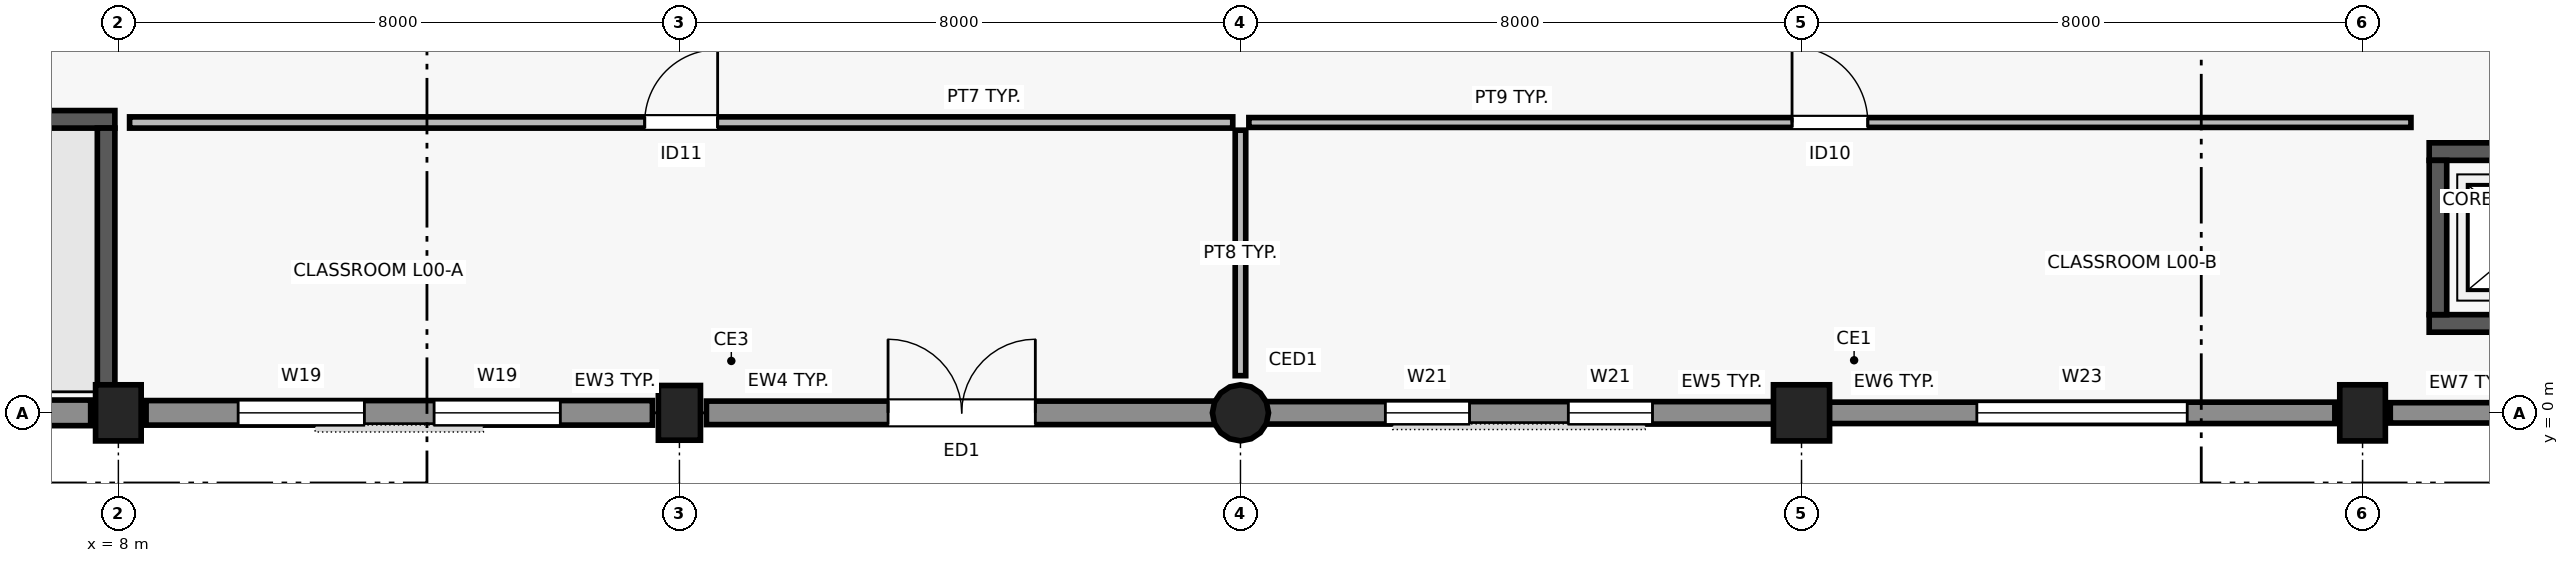
"""IFC4 building model, lengths in metres.
Left out: names, types, materials, properties, quantities, classifications, styles, units other than length and angle.
Written with IfcOpenShell. Run it as: python <this file> out.ifc"""

import sys

from ifc_helpers import new_model, si_unit, direction, frame, frame_2d, origin, origin_2d, place, context, subcontext, project, spatial, rectangle, circle, extrude, element, fill, save


model = new_model("IFC4")
c1 = context("Model", 3, precision=1e-05, world=origin(), true_north=direction((0.0, 1.0)))
c2 = subcontext(c1, "Body", "Model", "MODEL_VIEW")
j1 = project(units=[si_unit("LENGTHUNIT", "METRE"), si_unit("PLANEANGLEUNIT", "RADIAN")], contexts=[c1])
p1 = place(None, origin())
s1 = spatial("IfcSite", under=j1, at=p1, CompositionType="ELEMENT")
p2 = place(p1, origin())
s2 = spatial("IfcBuilding", under=s1, at=p2, CompositionType="ELEMENT")
p3 = place(p2, origin())
s3 = spatial("IfcBuildingStorey", under=s2, at=p3, CompositionType="ELEMENT", Elevation=0.0)
p4 = place(p3, frame((8.0, 0.0, 0.0), z_axis=(0.0, 0.0, 1.0), x_axis=(1.0, 0.0, 0.0)))
e1 = element("IfcColumn", 1, at=p4, inside=s3, PredefinedType="COLUMN", context=c2, shape_type="SweptSolid", body=[
    extrude(rectangle(XDim=0.8, YDim=0.65, at=origin_2d()), origin(), (0.0, 0.0, 1.0), 4.5),
])
p5 = place(p3, frame((16.0, 0.0, 0.0), z_axis=(0.0, 0.0, 1.0), x_axis=(1.0, 0.0, 0.0)))
e2 = element("IfcColumn", 2, at=p5, inside=s3, PredefinedType="COLUMN", context=c2, shape_type="SweptSolid", body=[
    extrude(rectangle(XDim=0.78, YDim=0.6, at=origin_2d()), origin(), (0.0, 0.0, 1.0), 4.5),
])
p6 = place(p3, frame((24.0, 0.0, 0.0), z_axis=(0.0, 0.0, 1.0), x_axis=(1.0, 0.0, 0.0)))
e3 = element("IfcColumn", 3, at=p6, inside=s3, PredefinedType="COLUMN", context=c2, shape_type="SweptSolid", body=[
    extrude(circle(Radius=0.4, at=origin_2d()), origin(), (0.0, 0.0, 1.0), 4.5),
])
p7 = place(p3, frame((32.0, 0.0, 0.0), z_axis=(0.0, 0.0, 1.0), x_axis=(1.0, 0.0, 0.0)))
e4 = element("IfcColumn", 4, at=p7, inside=s3, PredefinedType="COLUMN", context=c2, shape_type="SweptSolid", body=[
    extrude(rectangle(XDim=0.8, YDim=0.8, at=origin_2d()), origin(), (0.0, 0.0, 1.0), 4.5),
])
p8 = place(p3, frame((40.0, 0.0, 0.0), z_axis=(0.0, 0.0, 1.0), x_axis=(1.0, 0.0, 0.0)))
e5 = element("IfcColumn", 5, at=p8, inside=s3, PredefinedType="COLUMN", context=c2, shape_type="SweptSolid", body=[
    extrude(rectangle(XDim=0.8, YDim=0.65, at=origin_2d()), origin(), (0.0, 0.0, 1.0), 4.5),
])
p9 = place(p3, frame((0.395, 0.0, 0.0), z_axis=(0.0, 0.0, 1.0), x_axis=(1.0, 0.0, 0.0)))
e6 = element("IfcWall", 6, at=p9, inside=s3, PredefinedType="SOLIDWALL", context=c2, shape_type="SweptSolid", body=[
    extrude(rectangle(XDim=7.21, YDim=0.365, at=frame_2d((3.605, 0.0))), origin(), (0.0, 0.0, 1.0), 4.22),
])
p10 = place(p9, frame((2.88, 0.0, 0.0)))
e7 = element("IfcOpeningElement", 7, at=p10, cuts=e6, PredefinedType="OPENING", context=c2, shape_type="SweptSolid", body=[
    extrude(rectangle(XDim=1.45, YDim=2.2, at=frame_2d((0.725, 1.1))), frame((0.0, 0.192, 0.0), z_axis=(0.0, -1.0, 0.0), x_axis=(1.0, 0.0, 0.0)), (0.0, 0.0, 1.0), 0.385),
])
p11 = place(p3, frame((8.395, 0.0, 0.0), z_axis=(0.0, 0.0, 1.0), x_axis=(1.0, 0.0, 0.0)))
e8 = element("IfcWall", 8, at=p11, inside=s3, PredefinedType="SOLIDWALL", context=c2, shape_type="SweptSolid", body=[
    extrude(rectangle(XDim=7.22, YDim=0.35, at=frame_2d((3.61, 0.0))), origin(), (0.0, 0.0, 1.0), 4.22),
])
p12 = place(p11, frame((1.313, 0.0, 0.9)))
e9 = element("IfcOpeningElement", 9, at=p12, cuts=e8, PredefinedType="OPENING", context=c2, shape_type="SweptSolid", body=[
    extrude(rectangle(XDim=1.8, YDim=1.25, at=frame_2d((0.9, 0.625))), frame((0.0, 0.185, 0.0), z_axis=(0.0, -1.0, 0.0), x_axis=(1.0, 0.0, 0.0)), (0.0, 0.0, 1.0), 0.37),
])
p13 = place(p11, frame((4.107, 0.0, 0.9)))
e10 = element("IfcOpeningElement", 10, at=p13, cuts=e8, PredefinedType="OPENING", context=c2, shape_type="SweptSolid", body=[
    extrude(rectangle(XDim=1.8, YDim=1.25, at=frame_2d((0.9, 0.625))), frame((0.0, 0.185, 0.0), z_axis=(0.0, -1.0, 0.0), x_axis=(1.0, 0.0, 0.0)), (0.0, 0.0, 1.0), 0.37),
])
p14 = place(p3, frame((16.385, 0.0, 0.0), z_axis=(0.0, 0.0, 1.0), x_axis=(1.0, 0.0, 0.0)))
e11 = element("IfcWall", 11, at=p14, inside=s3, PredefinedType="SOLIDWALL", context=c2, shape_type="SweptSolid", body=[
    extrude(rectangle(XDim=7.279, YDim=0.335, at=frame_2d((3.64, 0.0))), origin(), (0.0, 0.0, 1.0), 3.57),
])
p15 = place(p14, frame((2.59, 0.0, 0.0)))
e12 = element("IfcOpeningElement", 12, at=p15, cuts=e11, PredefinedType="OPENING", context=c2, shape_type="SweptSolid", body=[
    extrude(rectangle(XDim=2.1, YDim=2.4, at=frame_2d((1.05, 1.2))), frame((0.0, 0.177, 0.0), z_axis=(0.0, -1.0, 0.0), x_axis=(1.0, 0.0, 0.0)), (0.0, 0.0, 1.0), 0.355),
])
p16 = place(p3, frame((24.336, 0.0, 0.0), z_axis=(0.0, 0.0, 1.0), x_axis=(1.0, 0.0, 0.0)))
e13 = element("IfcWall", 13, at=p16, inside=s3, PredefinedType="SOLIDWALL", context=c2, shape_type="SweptSolid", body=[
    extrude(rectangle(XDim=7.269, YDim=0.32, at=frame_2d((3.635, 0.0))), origin(), (0.0, 0.0, 1.0), 3.54),
])
p17 = place(p16, frame((1.73, 0.0, 0.9)))
e14 = element("IfcOpeningElement", 14, at=p17, cuts=e13, PredefinedType="OPENING", context=c2, shape_type="SweptSolid", body=[
    extrude(rectangle(XDim=1.2, YDim=1.25, at=frame_2d((0.6, 0.625))), frame((0.0, 0.17, 0.0), z_axis=(0.0, -1.0, 0.0), x_axis=(1.0, 0.0, 0.0)), (0.0, 0.0, 1.0), 0.34),
])
p18 = place(p16, frame((4.339, 0.0, 0.9)))
e15 = element("IfcOpeningElement", 15, at=p18, cuts=e13, PredefinedType="OPENING", context=c2, shape_type="SweptSolid", body=[
    extrude(rectangle(XDim=1.2, YDim=1.25, at=frame_2d((0.6, 0.625))), frame((0.0, 0.17, 0.0), z_axis=(0.0, -1.0, 0.0), x_axis=(1.0, 0.0, 0.0)), (0.0, 0.0, 1.0), 0.34),
])
p19 = place(p3, frame((32.395, 0.0, 0.0), z_axis=(0.0, 0.0, 1.0), x_axis=(1.0, 0.0, 0.0)))
e16 = element("IfcWall", 16, at=p19, inside=s3, PredefinedType="SOLIDWALL", context=c2, shape_type="SweptSolid", body=[
    extrude(rectangle(XDim=7.21, YDim=0.305, at=frame_2d((3.605, 0.0))), origin(), (0.0, 0.0, 1.0), 3.67),
])
p20 = place(p19, frame((2.105, 0.0, 0.9)))
e17 = element("IfcOpeningElement", 17, at=p20, cuts=e16, PredefinedType="OPENING", context=c2, shape_type="SweptSolid", body=[
    extrude(rectangle(XDim=3.0, YDim=1.65, at=frame_2d((1.5, 0.825))), frame((0.0, 0.162, 0.0), z_axis=(0.0, -1.0, 0.0), x_axis=(1.0, 0.0, 0.0)), (0.0, 0.0, 1.0), 0.325),
])
p21 = place(p3, frame((40.395, 0.0, 0.0), z_axis=(0.0, 0.0, 1.0), x_axis=(1.0, 0.0, 0.0)))
e18 = element("IfcWall", 18, at=p21, inside=s3, PredefinedType="SOLIDWALL", context=c2, shape_type="SweptSolid", body=[
    extrude(rectangle(XDim=7.22, YDim=0.29, at=frame_2d((3.61, 0.0))), origin(), (0.0, 0.0, 1.0), 3.54),
])
p22 = place(p21, frame((2.512, 0.0, 0.9)))
e19 = element("IfcOpeningElement", 19, at=p22, cuts=e18, PredefinedType="OPENING", context=c2, shape_type="SweptSolid", body=[
    extrude(rectangle(XDim=2.6, YDim=1.65, at=frame_2d((1.3, 0.825))), frame((0.0, 0.155, 0.0), z_axis=(0.0, -1.0, 0.0), x_axis=(1.0, 0.0, 0.0)), (0.0, 0.0, 1.0), 0.31),
])
p23 = place(p3, frame((40.95, 1.275, 0.0), z_axis=(0.0, 0.0, 1.0), x_axis=(1.0, 0.0, 0.0)))
e20 = element("IfcWall", 20, at=p23, inside=s3, PredefinedType="SHEAR", context=c2, shape_type="SweptSolid", body=[
    extrude(rectangle(XDim=2.9, YDim=0.25, at=frame_2d((1.45, 0.0))), origin(), (0.0, 0.0, 1.0), 4.22),
])
p24 = place(p3, frame((40.95, 3.725, 0.0), z_axis=(0.0, 0.0, 1.0), x_axis=(1.0, 0.0, 0.0)))
e21 = element("IfcWall", 21, at=p24, inside=s3, PredefinedType="SHEAR", context=c2, shape_type="SweptSolid", body=[
    extrude(rectangle(XDim=2.9, YDim=0.25, at=frame_2d((1.45, 0.0))), origin(), (0.0, 0.0, 1.0), 4.22),
])
p25 = place(p24, frame((0.95, 0.0, 0.0)))
e22 = element("IfcOpeningElement", 22, at=p25, cuts=e21, PredefinedType="OPENING", context=c2, shape_type="SweptSolid", body=[
    extrude(rectangle(XDim=1.0, YDim=2.15, at=frame_2d((0.5, 1.075))), frame((0.0, 0.135, 0.0), z_axis=(0.0, -1.0, 0.0), x_axis=(1.0, 0.0, 0.0)), (0.0, 0.0, 1.0), 0.27),
])
p26 = place(p3, frame((41.075, 1.4, 0.0), z_axis=(0.0, 0.0, 1.0), x_axis=(0.0, 1.0, 0.0)))
e23 = element("IfcWall", 23, at=p26, inside=s3, PredefinedType="SHEAR", context=c2, shape_type="SweptSolid", body=[
    extrude(rectangle(XDim=2.2, YDim=0.25, at=frame_2d((1.1, 0.0))), origin(), (0.0, 0.0, 1.0), 4.22),
])
p27 = place(p3, frame((0.05, 4.185, 0.0), z_axis=(0.0, 0.0, 1.0), x_axis=(1.0, 0.0, 0.0)))
e24 = element("IfcWall", 24, at=p27, inside=s3, PredefinedType="SHEAR", context=c2, shape_type="SweptSolid", body=[
    extrude(rectangle(XDim=7.9, YDim=0.25, at=frame_2d((3.95, 0.0))), origin(), (0.0, 0.0, 1.0), 4.22),
])
p28 = place(p27, frame((0.5, 0.0, 0.0)))
e25 = element("IfcOpeningElement", 25, at=p28, cuts=e24, PredefinedType="OPENING", context=c2, shape_type="SweptSolid", body=[
    extrude(rectangle(XDim=1.25, YDim=2.2, at=frame_2d((0.625, 1.1))), frame((0.0, 0.135, 0.0), z_axis=(0.0, -1.0, 0.0), x_axis=(1.0, 0.0, 0.0)), (0.0, 0.0, 1.0), 0.27),
])
p29 = place(p3, frame((7.825, 0.3, 0.0), z_axis=(0.0, 0.0, 1.0), x_axis=(0.0, 1.0, 0.0)))
e26 = element("IfcWall", 26, at=p29, inside=s3, PredefinedType="SHEAR", context=c2, shape_type="SweptSolid", body=[
    extrude(rectangle(XDim=3.76, YDim=0.25, at=frame_2d((1.88, 0.0))), origin(), (0.0, 0.0, 1.0), 4.22),
])
p30 = place(p3, frame((8.16, 4.14, 0.0), z_axis=(0.0, 0.0, 1.0), x_axis=(1.0, 0.0, 0.0)))
e27 = element("IfcWall", 27, at=p30, inside=s3, PredefinedType="PARTITIONING", context=c2, shape_type="SweptSolid", body=[
    extrude(rectangle(XDim=15.73, YDim=0.16, at=frame_2d((7.865, 0.0))), origin(), (0.0, 0.0, 1.0), 4.2),
])
p31 = place(p30, frame((7.345, 0.0, 0.0)))
e28 = element("IfcOpeningElement", 28, at=p31, cuts=e27, PredefinedType="OPENING", context=c2, shape_type="SweptSolid", body=[
    extrude(rectangle(XDim=1.04, YDim=2.15, at=frame_2d((0.52, 1.075))), frame((0.0, 0.09, 0.0), z_axis=(0.0, -1.0, 0.0), x_axis=(1.0, 0.0, 0.0)), (0.0, 0.0, 1.0), 0.18),
])
p32 = place(p3, frame((24.0, 0.53, 0.0), z_axis=(0.0, 0.0, 1.0), x_axis=(0.0, 1.0, 0.0)))
e29 = element("IfcWall", 29, at=p32, inside=s3, PredefinedType="PARTITIONING", context=c2, shape_type="SweptSolid", body=[
    extrude(rectangle(XDim=3.5, YDim=0.15, at=frame_2d((1.75, 0.0))), origin(), (0.0, 0.0, 1.0), 3.7),
])
p33 = place(p3, frame((24.12, 4.14, 0.0), z_axis=(0.0, 0.0, 1.0), x_axis=(1.0, 0.0, 0.0)))
e30 = element("IfcWall", 30, at=p33, inside=s3, PredefinedType="PARTITIONING", context=c2, shape_type="SweptSolid", body=[
    extrude(rectangle(XDim=16.57, YDim=0.14, at=frame_2d((8.285, 0.0))), origin(), (0.0, 0.0, 1.0), 4.2),
])
p34 = place(p33, frame((7.745, 0.0, 0.0)))
e31 = element("IfcOpeningElement", 31, at=p34, cuts=e30, PredefinedType="OPENING", context=c2, shape_type="SweptSolid", body=[
    extrude(rectangle(XDim=1.08, YDim=2.15, at=frame_2d((0.54, 1.075))), frame((0.0, 0.08, 0.0), z_axis=(0.0, -1.0, 0.0), x_axis=(1.0, 0.0, 0.0)), (0.0, 0.0, 1.0), 0.16),
])
p35 = place(p12, origin())
e32 = element("IfcWindow", 32, at=p35, inside=s3, PartitioningType="SINGLE_PANEL", PredefinedType="WINDOW", context=c2, shape_type="SweptSolid", body=[
    extrude(rectangle(XDim=1.8, YDim=1.25, at=frame_2d((0.9, 0.625))), frame((0.0, 0.03, 0.0), z_axis=(0.0, -1.0, 0.0), x_axis=(1.0, 0.0, 0.0)), (0.0, 0.0, 1.0), 0.06),
])
fill(e9, e32)
p36 = place(p13, origin())
e33 = element("IfcWindow", 33, at=p36, inside=s3, PartitioningType="SINGLE_PANEL", PredefinedType="WINDOW", context=c2, shape_type="SweptSolid", body=[
    extrude(rectangle(XDim=1.8, YDim=1.25, at=frame_2d((0.9, 0.625))), frame((0.0, 0.03, 0.0), z_axis=(0.0, -1.0, 0.0), x_axis=(1.0, 0.0, 0.0)), (0.0, 0.0, 1.0), 0.06),
])
fill(e10, e33)
p37 = place(p15, frame((2.1, 0.0, 0.0), z_axis=(0.0, 0.0, 1.0), x_axis=(-1.0, 0.0, 0.0)))
e34 = element("IfcDoor", 34, at=p37, inside=s3, OperationType="DOUBLE_DOOR_SINGLE_SWING", PredefinedType="DOOR", context=c2, shape_type="SweptSolid", body=[
    extrude(rectangle(XDim=2.1, YDim=2.4, at=frame_2d((1.05, 1.2))), frame((0.0, 0.025, 0.0), z_axis=(0.0, -1.0, 0.0), x_axis=(1.0, 0.0, 0.0)), (0.0, 0.0, 1.0), 0.05),
])
fill(e12, e34)
p38 = place(p17, origin())
e35 = element("IfcWindow", 35, at=p38, inside=s3, PartitioningType="SINGLE_PANEL", PredefinedType="WINDOW", context=c2, shape_type="SweptSolid", body=[
    extrude(rectangle(XDim=1.2, YDim=1.25, at=frame_2d((0.6, 0.625))), frame((0.0, 0.03, 0.0), z_axis=(0.0, -1.0, 0.0), x_axis=(1.0, 0.0, 0.0)), (0.0, 0.0, 1.0), 0.06),
])
fill(e14, e35)
p39 = place(p18, origin())
e36 = element("IfcWindow", 36, at=p39, inside=s3, PartitioningType="SINGLE_PANEL", PredefinedType="WINDOW", context=c2, shape_type="SweptSolid", body=[
    extrude(rectangle(XDim=1.2, YDim=1.25, at=frame_2d((0.6, 0.625))), frame((0.0, 0.03, 0.0), z_axis=(0.0, -1.0, 0.0), x_axis=(1.0, 0.0, 0.0)), (0.0, 0.0, 1.0), 0.06),
])
fill(e15, e36)
p40 = place(p20, origin())
e37 = element("IfcWindow", 37, at=p40, inside=s3, PartitioningType="SINGLE_PANEL", PredefinedType="WINDOW", context=c2, shape_type="SweptSolid", body=[
    extrude(rectangle(XDim=3.0, YDim=1.65, at=frame_2d((1.5, 0.825))), frame((0.0, 0.03, 0.0), z_axis=(0.0, -1.0, 0.0), x_axis=(1.0, 0.0, 0.0)), (0.0, 0.0, 1.0), 0.06),
])
fill(e17, e37)
p41 = place(p31, origin())
e38 = element("IfcDoor", 38, at=p41, inside=s3, OperationType="SINGLE_SWING_RIGHT", PredefinedType="DOOR", context=c2, shape_type="SweptSolid", body=[
    extrude(rectangle(XDim=1.04, YDim=2.15, at=frame_2d((0.52, 1.075))), frame((0.0, 0.025, 0.0), z_axis=(0.0, -1.0, 0.0), x_axis=(1.0, 0.0, 0.0)), (0.0, 0.0, 1.0), 0.05),
])
fill(e28, e38)
p42 = place(p34, origin())
e39 = element("IfcDoor", 39, at=p42, inside=s3, OperationType="SINGLE_SWING_LEFT", PredefinedType="DOOR", context=c2, shape_type="SweptSolid", body=[
    extrude(rectangle(XDim=1.08, YDim=2.15, at=frame_2d((0.54, 1.075))), frame((0.0, 0.025, 0.0), z_axis=(0.0, -1.0, 0.0), x_axis=(1.0, 0.0, 0.0)), (0.0, 0.0, 1.0), 0.05),
])
fill(e31, e39)
save(model, sys.argv[1])
